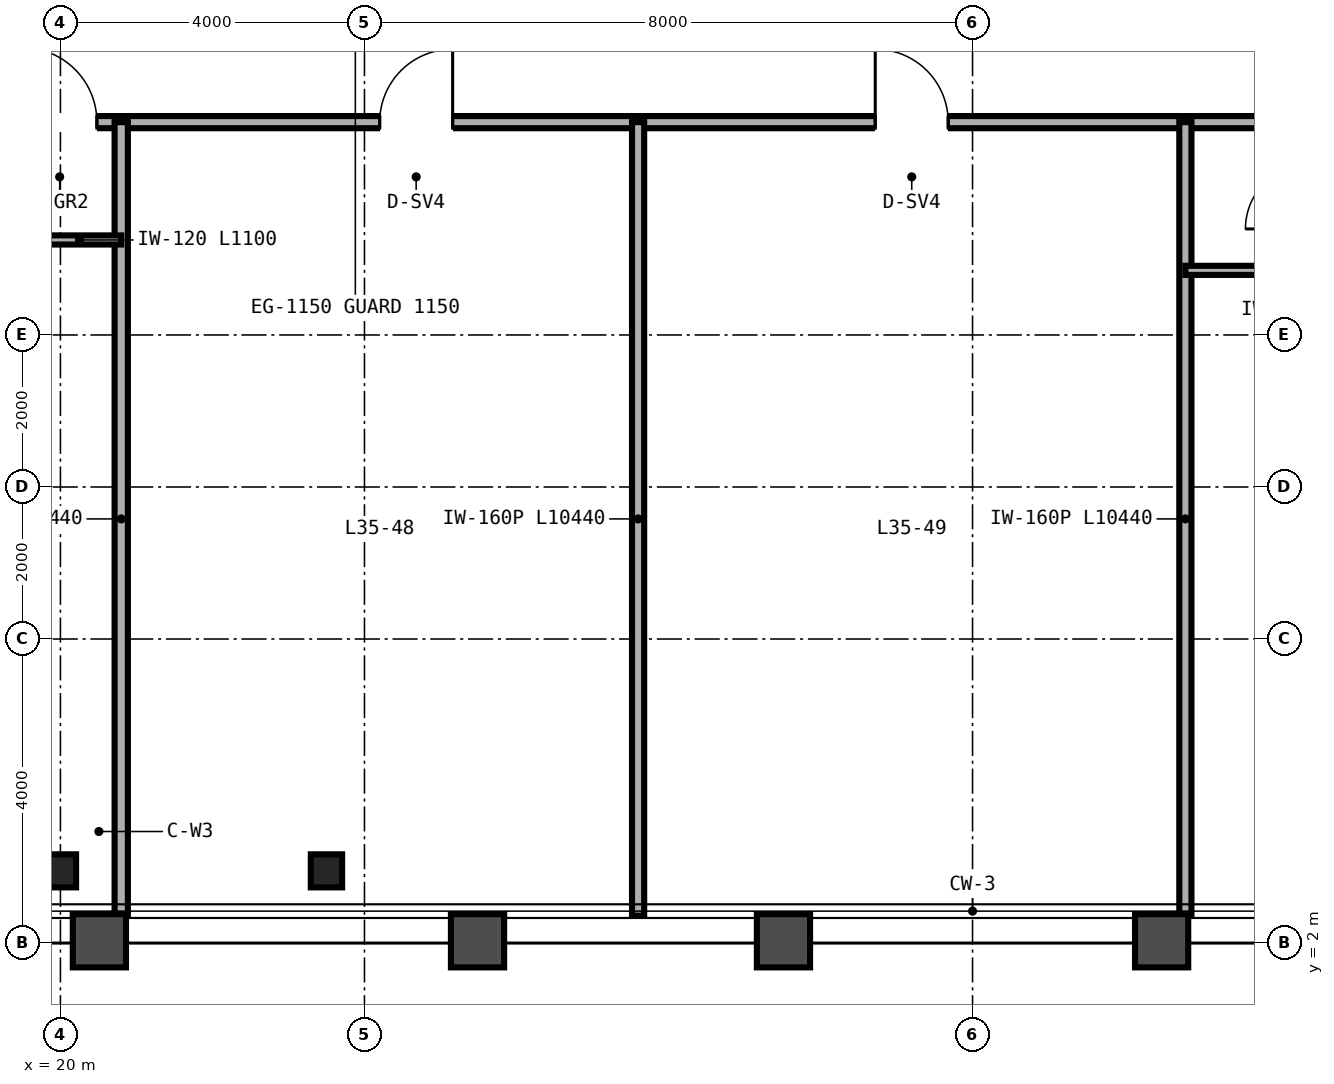
"""IFC4 building model, lengths in metres.
Left out: names, types, materials, properties, quantities, classifications, styles, units other than length and angle.
Written with IfcOpenShell. Run it as: python <this file> out.ifc"""

import sys

from ifc_helpers import new_model, si_unit, direction, frame, frame_2d, origin, origin_2d, place, context, subcontext, project, spatial, rectangle, i_section, extrude, source, transform, mapped, element, fill, save


model = new_model("IFC4")
c1 = context("Model", 3, precision=1e-05, world=origin(), true_north=direction((0.0, 1.0)))
c2 = subcontext(c1, "Body", "Model", "MODEL_VIEW")
j1 = project(units=[si_unit("LENGTHUNIT", "METRE"), si_unit("PLANEANGLEUNIT", "RADIAN")], contexts=[c1])
p1 = place(None, origin())
s1 = spatial("IfcSite", under=j1, at=p1, CompositionType="ELEMENT")
p2 = place(p1, origin())
s2 = spatial("IfcBuilding", under=s1, at=p2, CompositionType="ELEMENT")
p3 = place(p2, frame((0.0, 0.0, 140.4)))
s3 = spatial("IfcBuildingStorey", under=s2, at=p3, CompositionType="ELEMENT", Elevation=140.4)
m1 = source(origin(), c2, "Body", "SweptSolid", [
    extrude(i_section(OverallWidth=0.412, OverallDepth=0.435, WebThickness=0.036, FlangeThickness=0.057, FilletRadius=0.025, at=origin_2d()), origin(), (0.0, 0.0, 1.0), 3.36),
])
for number, where, z_axis, x_axis in (
    (1, (20.0, 2.95, 0.0), (0.0, 0.0, 1.0), (1.0, 0.0, 0.0)),
    (2, (23.5, 2.95, 0.0), (0.0, 0.0, 1.0), (1.0, 0.0, 0.0)),
):
    element("IfcColumn", number, at=place(p3, frame(where, z_axis=z_axis, x_axis=x_axis)), inside=s3, PredefinedType="COLUMN", context=c2, shape_type="MappedRepresentation", body=[
        mapped(m1, transform((0.0, 0.0, 0.0), scale=1.0)),
    ])
p4 = place(p3, frame((14.0, 12.8, 0.0), z_axis=(0.0, 0.0, 1.0), x_axis=(1.0, 0.0, 0.0)))
e3 = element("IfcWall", 3, at=p4, inside=s3, PredefinedType="PARTITIONING", context=c2, shape_type="SweptSolid", body=[
    extrude(rectangle(XDim=36.0, YDim=0.16, at=frame_2d((18.0, 0.0))), origin(), (0.0, 0.0, 1.0), 2.581),
])
p5 = place(p4, frame((5.5, 0.0, 0.0)))
e4 = element("IfcOpeningElement", 4, at=p5, cuts=e3, PredefinedType="OPENING", context=c2, shape_type="SweptSolid", body=[
    extrude(rectangle(XDim=0.98, YDim=2.2, at=frame_2d((0.49, 1.1))), frame((0.0, 0.09, 0.0), z_axis=(0.0, -1.0, 0.0), x_axis=(1.0, 0.0, 0.0)), (0.0, 0.0, 1.0), 0.18),
])
p6 = place(p4, frame((10.2, 0.0, 0.0)))
e5 = element("IfcOpeningElement", 5, at=p6, cuts=e3, PredefinedType="OPENING", context=c2, shape_type="SweptSolid", body=[
    extrude(rectangle(XDim=0.96, YDim=2.15, at=frame_2d((0.48, 1.075))), frame((0.0, 0.09, 0.0), z_axis=(0.0, -1.0, 0.0), x_axis=(1.0, 0.0, 0.0)), (0.0, 0.0, 1.0), 0.18),
])
p7 = place(p4, frame((16.72, 0.0, 0.0)))
e6 = element("IfcOpeningElement", 6, at=p7, cuts=e3, PredefinedType="OPENING", context=c2, shape_type="SweptSolid", body=[
    extrude(rectangle(XDim=0.96, YDim=2.15, at=frame_2d((0.48, 1.075))), frame((0.0, 0.09, 0.0), z_axis=(0.0, -1.0, 0.0), x_axis=(1.0, 0.0, 0.0)), (0.0, 0.0, 1.0), 0.18),
])
p8 = place(p4, frame((27.14, 0.0, 0.0)))
e7 = element("IfcOpeningElement", 7, at=p8, cuts=e3, PredefinedType="OPENING", context=c2, shape_type="SweptSolid", body=[
    extrude(rectangle(XDim=0.94, YDim=2.15, at=frame_2d((0.47, 1.075))), frame((0.0, 0.09, 0.0), z_axis=(0.0, -1.0, 0.0), x_axis=(1.0, 0.0, 0.0)), (0.0, 0.0, 1.0), 0.18),
])
p9 = place(p4, frame((34.74, 0.0, 0.0)))
e8 = element("IfcOpeningElement", 8, at=p9, cuts=e3, PredefinedType="OPENING", context=c2, shape_type="SweptSolid", body=[
    extrude(rectangle(XDim=0.94, YDim=2.15, at=frame_2d((0.47, 1.075))), frame((0.0, 0.09, 0.0), z_axis=(0.0, -1.0, 0.0), x_axis=(1.0, 0.0, 0.0)), (0.0, 0.0, 1.0), 0.18),
])
p10 = place(p3, frame((20.8, 2.36, 0.0), z_axis=(0.0, 0.0, 1.0), x_axis=(0.0, 1.0, 0.0)))
e9 = element("IfcWall", 9, at=p10, inside=s3, PredefinedType="PARTITIONING", context=c2, shape_type="SweptSolid", body=[
    extrude(rectangle(XDim=10.44, YDim=0.175, at=frame_2d((5.22, 0.0))), origin(), (0.0, 0.0, 1.0), 2.823),
])
p11 = place(p3, frame((19.7, 11.25, 0.0), z_axis=(0.0, 0.0, 1.0), x_axis=(1.0, 0.0, 0.0)))
e10 = element("IfcWall", 10, at=p11, inside=s3, PredefinedType="PARTITIONING", context=c2, shape_type="SweptSolid", body=[
    extrude(rectangle(XDim=1.1, YDim=0.12, at=frame_2d((0.55, 0.0))), origin(), (0.0, 0.0, 1.0), 3.36),
])
for number, where, z_axis, x_axis in (
    (11, (27.6, 2.36, 0.0), (0.0, 0.0, 1.0), (0.0, 1.0, 0.0)),
    (12, (34.8, 2.36, 0.0), (0.0, 0.0, 1.0), (0.0, 1.0, 0.0)),
):
    element("IfcWall", number, at=place(p3, frame(where, z_axis=z_axis, x_axis=x_axis)), inside=s3, PredefinedType="PARTITIONING", context=c2, shape_type="SweptSolid", body=[
        extrude(rectangle(XDim=10.44, YDim=0.16, at=frame_2d((5.22, 0.0))), origin(), (0.0, 0.0, 1.0), 2.433),
    ])
p12 = place(p3, frame((34.8, 10.85, 0.0), z_axis=(0.0, 0.0, 1.0), x_axis=(1.0, 0.0, 0.0)))
e13 = element("IfcWall", 13, at=p12, inside=s3, PredefinedType="PARTITIONING", context=c2, shape_type="SweptSolid", body=[
    extrude(rectangle(XDim=1.65, YDim=0.12, at=frame_2d((0.825, 0.0))), origin(), (0.0, 0.0, 1.0), 3.36),
])
m2 = source(origin(), c2, "Body", "SweptSolid", [
    extrude(rectangle(XDim=0.98, YDim=2.2, at=frame_2d((0.49, 1.1))), frame((0.0, 0.025, 0.0), z_axis=(0.0, -1.0, 0.0), x_axis=(1.0, 0.0, 0.0)), (0.0, 0.0, 1.0), 0.05),
])
p13 = place(p5, origin())
e14 = element("IfcDoor", 14, at=p13, inside=s3, OperationType="SINGLE_SWING_LEFT", PredefinedType="DOOR", context=c2, shape_type="MappedRepresentation", body=[
    mapped(m2, transform((0.0, 0.0, 0.0), scale=1.0)),
])
fill(e4, e14)
m3 = source(origin(), c2, "Body", "SweptSolid", [
    extrude(rectangle(XDim=0.96, YDim=2.15, at=frame_2d((0.48, 1.075))), frame((0.0, 0.025, 0.0), z_axis=(0.0, -1.0, 0.0), x_axis=(1.0, 0.0, 0.0)), (0.0, 0.0, 1.0), 0.05),
])
p14 = place(p6, origin())
e15 = element("IfcDoor", 15, at=p14, inside=s3, OperationType="SINGLE_SWING_RIGHT", PredefinedType="DOOR", context=c2, shape_type="MappedRepresentation", body=[
    mapped(m3, transform((0.0, 0.0, 0.0), scale=1.0)),
])
fill(e5, e15)
p15 = place(p7, origin())
e16 = element("IfcDoor", 16, at=p15, inside=s3, OperationType="SINGLE_SWING_LEFT", PredefinedType="DOOR", context=c2, shape_type="MappedRepresentation", body=[
    mapped(m3, transform((0.0, 0.0, 0.0), scale=1.0)),
])
fill(e6, e16)
save(model, sys.argv[1])
